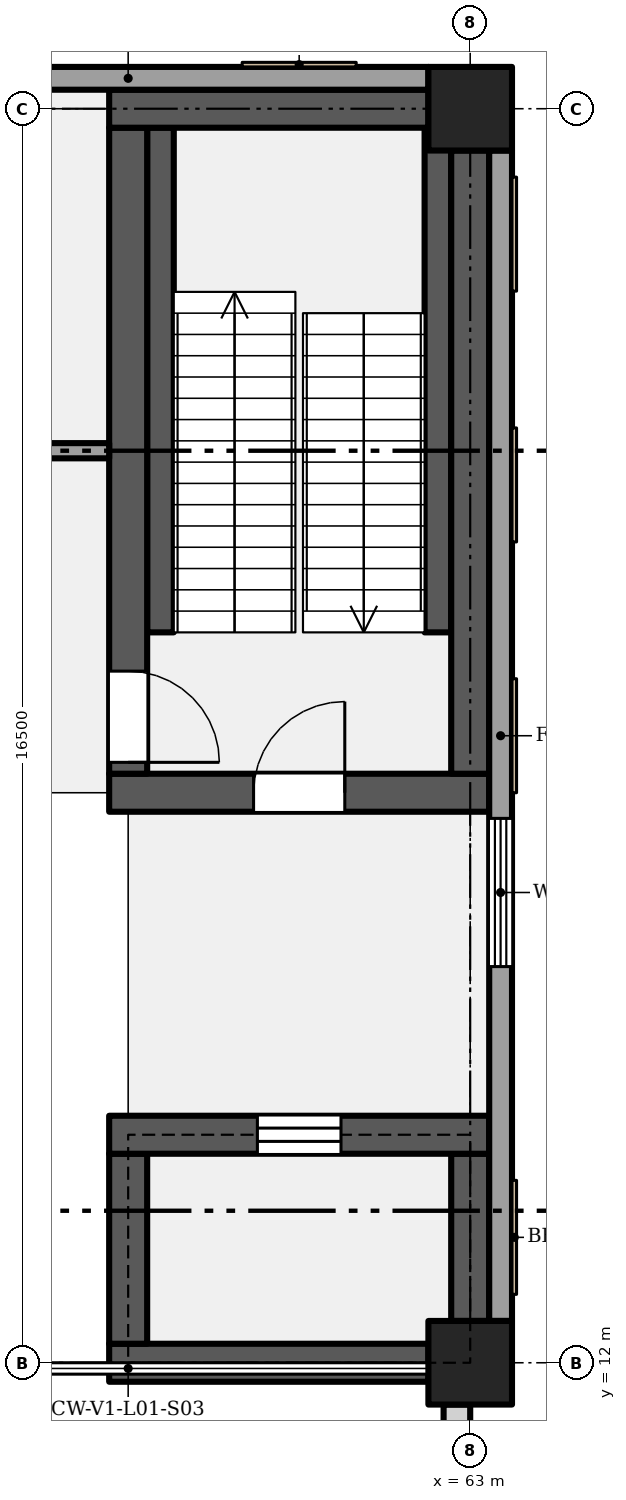
"""IFC4 building model, lengths in metres.
Left out: names, types, materials, properties, quantities, classifications, styles, units other than length and angle.
Written with IfcOpenShell. Run it as: python <this file> out.ifc"""

import sys

from ifc_helpers import new_model, si_unit, direction, frame, frame_2d, origin, origin_2d, place, context, subcontext, project, spatial, rectangle, extrude, element, fill, save


model = new_model("IFC4")
c1 = context("Model", 3, precision=1e-05, world=origin(), true_north=direction((0.0, 1.0)))
c2 = subcontext(c1, "Body", "Model", "MODEL_VIEW")
j1 = project(units=[si_unit("LENGTHUNIT", "METRE"), si_unit("PLANEANGLEUNIT", "RADIAN")], contexts=[c1])
p1 = place(None, origin())
s1 = spatial("IfcSite", under=j1, at=p1, CompositionType="ELEMENT")
p2 = place(p1, origin())
s2 = spatial("IfcBuilding", under=s1, at=p2, CompositionType="ELEMENT")
p3 = place(p2, frame((0.0, 0.0, 6.6)))
s3 = spatial("IfcBuildingStorey", under=s2, at=p3, CompositionType="ELEMENT", Elevation=6.6)
for number, where, z_axis, x_axis in (
    (1, (63.0, 12.0, 0.0), (0.0, 0.0, 1.0), (1.0, 0.0, 0.0)),
    (2, (63.0, 28.5, 0.0), (0.0, 0.0, 1.0), (1.0, 0.0, 0.0)),
):
    element("IfcColumn", number, at=place(p3, frame(where, z_axis=z_axis, x_axis=x_axis)), inside=s3, PredefinedType="COLUMN", context=c2, shape_type="SweptSolid", body=[
        extrude(rectangle(XDim=1.1, YDim=1.1, at=origin_2d()), origin(), (0.0, 0.0, 1.0), 5.4),
    ])
p4 = place(p3, frame((58.25, 12.0, 0.0), z_axis=(0.0, 0.0, 1.0), x_axis=(1.0, 0.0, 0.0)))
e3 = element("IfcWall", 3, at=p4, inside=s3, PredefinedType="SHEAR", context=c2, shape_type="SweptSolid", body=[
    extrude(rectangle(XDim=4.2, YDim=0.5, at=frame_2d((2.1, 0.0))), origin(), (0.0, 0.0, 1.0), 5.1),
])
p5 = place(p3, frame((58.5, 12.25, 0.0), z_axis=(0.0, 0.0, 1.0), x_axis=(0.0, 1.0, 0.0)))
e4 = element("IfcWall", 4, at=p5, inside=s3, PredefinedType="SHEAR", context=c2, shape_type="SweptSolid", body=[
    extrude(rectangle(XDim=2.5, YDim=0.5, at=frame_2d((1.25, 0.0))), origin(), (0.0, 0.0, 1.0), 5.1),
])
p6 = place(p3, frame((63.0, 12.55, 0.0), z_axis=(0.0, 0.0, 1.0), x_axis=(0.0, 1.0, 0.0)))
e5 = element("IfcWall", 5, at=p6, inside=s3, PredefinedType="SHEAR", context=c2, shape_type="SweptSolid", body=[
    extrude(rectangle(XDim=2.2, YDim=0.5, at=frame_2d((1.1, 0.0))), origin(), (0.0, 0.0, 1.0), 5.1),
])
p7 = place(p3, frame((58.25, 15.0, 0.0), z_axis=(0.0, 0.0, 1.0), x_axis=(1.0, 0.0, 0.0)))
e6 = element("IfcWall", 6, at=p7, inside=s3, PredefinedType="SHEAR", context=c2, shape_type="SweptSolid", body=[
    extrude(rectangle(XDim=5.0, YDim=0.5, at=frame_2d((2.5, 0.0))), origin(), (0.0, 0.0, 1.0), 5.1),
])
p8 = place(p7, frame((1.95, 0.0, 0.0)))
e7 = element("IfcOpeningElement", 7, at=p8, cuts=e6, PredefinedType="OPENING", context=c2, shape_type="SweptSolid", body=[
    extrude(rectangle(XDim=1.1, YDim=2.1, at=frame_2d((0.55, 1.05))), frame((0.0, 0.26, 0.0), z_axis=(0.0, -1.0, 0.0), x_axis=(1.0, 0.0, 0.0)), (0.0, 0.0, 1.0), 0.52),
])
p9 = place(p3, frame((58.25, 19.5, 0.0), z_axis=(0.0, 0.0, 1.0), x_axis=(1.0, 0.0, 0.0)))
e8 = element("IfcWall", 8, at=p9, inside=s3, PredefinedType="SHEAR", context=c2, shape_type="SweptSolid", body=[
    extrude(rectangle(XDim=5.0, YDim=0.5, at=frame_2d((2.5, 0.0))), origin(), (0.0, 0.0, 1.0), 5.1),
])
p10 = place(p9, frame((1.9, 0.0, 0.0)))
e9 = element("IfcOpeningElement", 9, at=p10, cuts=e8, PredefinedType="OPENING", context=c2, shape_type="SweptSolid", body=[
    extrude(rectangle(XDim=1.2, YDim=2.1, at=frame_2d((0.6, 1.05))), frame((0.0, 0.26, 0.0), z_axis=(0.0, -1.0, 0.0), x_axis=(1.0, 0.0, 0.0)), (0.0, 0.0, 1.0), 0.52),
])
p11 = place(p3, frame((58.5, 19.75, 0.0), z_axis=(0.0, 0.0, 1.0), x_axis=(0.0, 1.0, 0.0)))
e10 = element("IfcWall", 10, at=p11, inside=s3, PredefinedType="SHEAR", context=c2, shape_type="SweptSolid", body=[
    extrude(rectangle(XDim=8.5, YDim=0.5, at=frame_2d((4.25, 0.0))), origin(), (0.0, 0.0, 1.0), 5.1),
])
p12 = place(p11, frame((1.35, 0.0, 0.0), z_axis=(0.0, 0.0, 1.0), x_axis=(-1.0, 0.0, 0.0)))
e11 = element("IfcOpeningElement", 11, at=p12, cuts=e10, PredefinedType="OPENING", context=c2, shape_type="SweptSolid", body=[
    extrude(rectangle(XDim=1.2, YDim=2.1, at=frame_2d((0.6, 1.05))), frame((0.0, 0.26, 0.0), z_axis=(0.0, -1.0, 0.0), x_axis=(1.0, 0.0, 0.0)), (0.0, 0.0, 1.0), 0.52),
])
p13 = place(p3, frame((63.0, 19.75, 0.0), z_axis=(0.0, 0.0, 1.0), x_axis=(0.0, 1.0, 0.0)))
e12 = element("IfcWall", 12, at=p13, inside=s3, PredefinedType="SHEAR", context=c2, shape_type="SweptSolid", body=[
    extrude(rectangle(XDim=8.2, YDim=0.5, at=frame_2d((4.1, 0.0))), origin(), (0.0, 0.0, 1.0), 5.1),
])
p14 = place(p3, frame((58.25, 28.5, 0.0), z_axis=(0.0, 0.0, 1.0), x_axis=(1.0, 0.0, 0.0)))
e13 = element("IfcWall", 13, at=p14, inside=s3, PredefinedType="SHEAR", context=c2, shape_type="SweptSolid", body=[
    extrude(rectangle(XDim=4.2, YDim=0.5, at=frame_2d((2.1, 0.0))), origin(), (0.0, 0.0, 1.0), 5.1),
])
p15 = place(p3, frame((54.55, 28.9, 0.0), z_axis=(0.0, 0.0, 1.0), x_axis=(1.0, 0.0, 0.0)))
e14 = element("IfcWall", 14, at=p15, inside=s3, PredefinedType="SOLIDWALL", context=c2, shape_type="SweptSolid", body=[
    extrude(rectangle(XDim=7.9, YDim=0.3, at=frame_2d((3.95, 0.0))), origin(), (0.0, 0.0, 1.0), 5.1),
])
p16 = place(p15, frame((0.725, 0.0, 0.9)))
e15 = element("IfcOpeningElement", 15, at=p16, cuts=e14, PredefinedType="OPENING", context=c2, shape_type="SweptSolid", body=[
    extrude(rectangle(XDim=1.95, YDim=3.0, at=frame_2d((0.975, 1.5))), frame((0.0, 0.16, 0.0), z_axis=(0.0, -1.0, 0.0), x_axis=(1.0, 0.0, 0.0)), (0.0, 0.0, 1.0), 0.32),
])
p17 = place(p3, frame((63.4, 12.55, 0.0), z_axis=(0.0, 0.0, 1.0), x_axis=(0.0, 1.0, 0.0)))
e16 = element("IfcWall", 16, at=p17, inside=s3, PredefinedType="SOLIDWALL", context=c2, shape_type="SweptSolid", body=[
    extrude(rectangle(XDim=15.4, YDim=0.3, at=frame_2d((7.7, 0.0))), origin(), (0.0, 0.0, 1.0), 5.1),
])
p18 = place(p17, frame((4.663, 0.0, 0.9)))
e17 = element("IfcOpeningElement", 17, at=p18, cuts=e16, PredefinedType="OPENING", context=c2, shape_type="SweptSolid", body=[
    extrude(rectangle(XDim=1.95, YDim=3.0, at=frame_2d((0.975, 1.5))), frame((0.0, 0.16, 0.0), z_axis=(0.0, -1.0, 0.0), x_axis=(1.0, 0.0, 0.0)), (0.0, 0.0, 1.0), 0.32),
])
p19 = place(p3, frame((62.825, 0.7, 0.0), z_axis=(0.0, 0.0, 1.0), x_axis=(0.0, 1.0, 0.0)))
e18 = element("IfcWall", 18, at=p19, inside=s3, PredefinedType="SOLIDWALL", context=c2, shape_type="SweptSolid", body=[
    extrude(rectangle(XDim=10.75, YDim=0.35, at=frame_2d((5.375, 0.0))), origin(), (0.0, 0.0, 1.0), 5.4),
])
p20 = place(p3, frame((45.0, 24.0, 0.0), z_axis=(0.0, 0.0, 1.0), x_axis=(1.0, 0.0, 0.0)))
e19 = element("IfcWall", 19, at=p20, inside=s3, PredefinedType="PARTITIONING", context=c2, shape_type="SweptSolid", body=[
    extrude(rectangle(XDim=13.25, YDim=0.2, at=frame_2d((6.625, 0.0))), origin(), (0.0, 0.0, 1.0), 5.1),
])
p21 = place(p20, frame((7.95, 0.0, 0.0), z_axis=(0.0, 0.0, 1.0), x_axis=(-1.0, 0.0, 0.0)))
e20 = element("IfcOpeningElement", 20, at=p21, cuts=e19, PredefinedType="OPENING", context=c2, shape_type="SweptSolid", body=[
    extrude(rectangle(XDim=2.4, YDim=2.7, at=frame_2d((1.2, 1.35))), frame((0.0, 0.11, 0.0), z_axis=(0.0, -1.0, 0.0), x_axis=(1.0, 0.0, 0.0)), (0.0, 0.0, 1.0), 0.22),
])
p22 = place(p3, frame((58.925, 21.61, 0.0), z_axis=(0.0, 0.0, 1.0), x_axis=(0.0, 1.0, 0.0)))
e21 = element("IfcWall", 21, at=p22, inside=s3, PredefinedType="SHEAR", context=c2, shape_type="SweptSolid", body=[
    extrude(rectangle(XDim=6.64, YDim=0.35, at=frame_2d((3.32, 0.0))), origin(), (0.0, 0.0, 1.0), 2.587),
])
p23 = place(p3, frame((62.575, 21.61, 0.0), z_axis=(0.0, 0.0, 1.0), x_axis=(0.0, 1.0, 0.0)))
e22 = element("IfcWall", 22, at=p23, inside=s3, PredefinedType="SHEAR", context=c2, shape_type="SweptSolid", body=[
    extrude(rectangle(XDim=6.64, YDim=0.35, at=frame_2d((3.32, 0.0))), origin(), (0.0, 0.0, 1.0), 5.1),
])
p24 = place(p18, origin())
e23 = element("IfcWindow", 23, at=p24, inside=s3, PartitioningType="SINGLE_PANEL", PredefinedType="WINDOW", context=c2, shape_type="SweptSolid", body=[
    extrude(rectangle(XDim=1.95, YDim=3.0, at=frame_2d((0.975, 1.5))), frame((0.0, 0.03, 0.0), z_axis=(0.0, -1.0, 0.0), x_axis=(1.0, 0.0, 0.0)), (0.0, 0.0, 1.0), 0.06),
])
fill(e17, e23)
p25 = place(p10, origin())
e24 = element("IfcDoor", 24, at=p25, inside=s3, OperationType="SINGLE_SWING_RIGHT", PredefinedType="DOOR", context=c2, shape_type="SweptSolid", body=[
    extrude(rectangle(XDim=1.2, YDim=2.1, at=frame_2d((0.6, 1.05))), frame((0.0, 0.025, 0.0), z_axis=(0.0, -1.0, 0.0), x_axis=(1.0, 0.0, 0.0)), (0.0, 0.0, 1.0), 0.05),
])
fill(e9, e24)
p26 = place(p12, origin())
e25 = element("IfcDoor", 25, at=p26, inside=s3, OperationType="SINGLE_SWING_RIGHT", PredefinedType="DOOR", context=c2, shape_type="SweptSolid", body=[
    extrude(rectangle(XDim=1.2, YDim=2.1, at=frame_2d((0.6, 1.05))), frame((0.0, 0.025, 0.0), z_axis=(0.0, -1.0, 0.0), x_axis=(1.0, 0.0, 0.0)), (0.0, 0.0, 1.0), 0.05),
])
fill(e11, e25)
p27 = place(p8, origin())
e26 = element("IfcDoor", 26, at=p27, inside=s3, OperationType="SLIDING_TO_LEFT", PredefinedType="DOOR", context=c2, shape_type="SweptSolid", body=[
    extrude(rectangle(XDim=1.1, YDim=2.1, at=frame_2d((0.55, 1.05))), frame((0.0, 0.025, 0.0), z_axis=(0.0, -1.0, 0.0), x_axis=(1.0, 0.0, 0.0)), (0.0, 0.0, 1.0), 0.05),
])
fill(e7, e26)
save(model, sys.argv[1])
